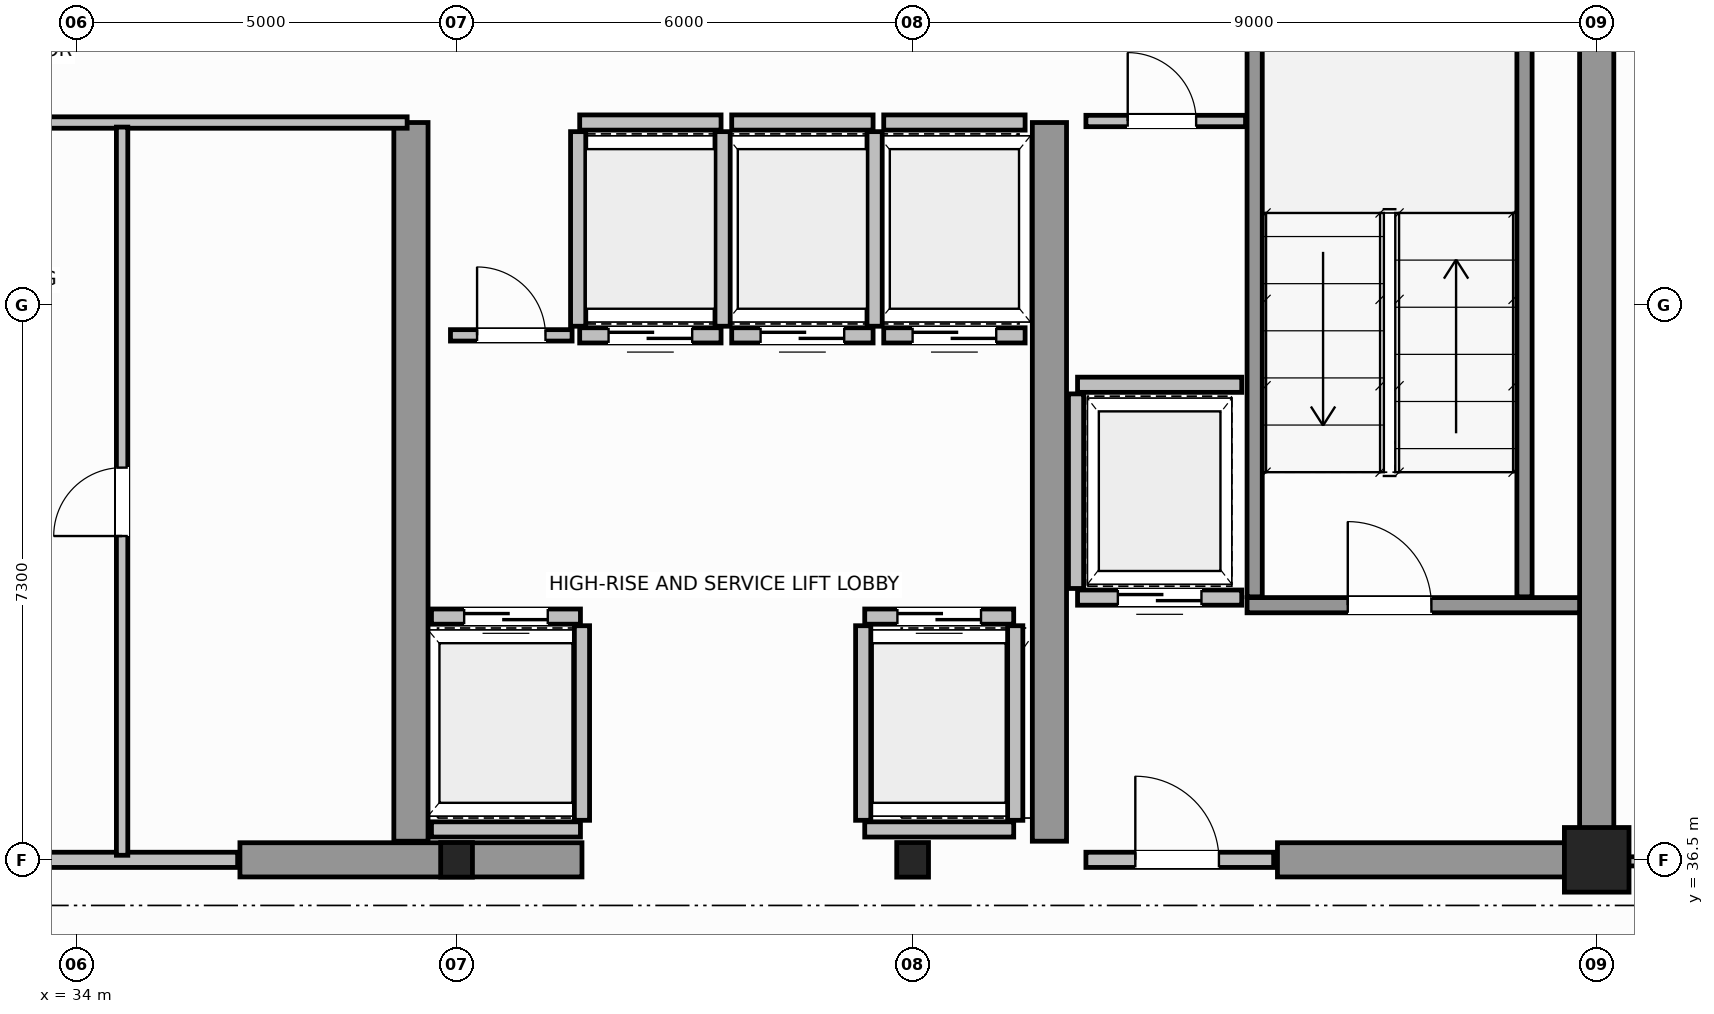
"""IFC4 building model, lengths in metres.
Left out: names, types, materials, properties, quantities, classifications, styles, units other than length and angle.
Written with IfcOpenShell. Run it as: python <this file> out.ifc"""

import sys

from ifc_helpers import new_model, si_unit, direction, frame, frame_2d, origin, origin_2d, place, context, subcontext, project, spatial, rectangle, i_section, extrude, source, transform, mapped, element, fill, save


model = new_model("IFC4")
c1 = context("Model", 3, precision=1e-05, world=origin(), true_north=direction((0.0, 1.0)))
c2 = subcontext(c1, "Body", "Model", "MODEL_VIEW")
j1 = project(units=[si_unit("LENGTHUNIT", "METRE"), si_unit("PLANEANGLEUNIT", "RADIAN")], contexts=[c1])
p1 = place(None, origin())
s1 = spatial("IfcSite", under=j1, at=p1, CompositionType="ELEMENT")
p2 = place(p1, origin())
s2 = spatial("IfcBuilding", under=s1, at=p2, CompositionType="ELEMENT")
p3 = place(p2, frame((0.0, 0.0, 265.0)))
s3 = spatial("IfcBuildingStorey", under=s2, at=p3, CompositionType="ELEMENT", Elevation=265.0)
m1 = source(origin(), c2, "Body", "SweptSolid", [
    extrude(i_section(OverallWidth=0.418, OverallDepth=0.455, WebThickness=0.042, FlangeThickness=0.058, FilletRadius=0.015, at=origin_2d()), origin(), (0.0, 0.0, 1.0), 3.8),
])
for number, where, z_axis, x_axis in (
    (1, (39.0, 36.5, 0.0), (0.0, 0.0, 1.0), (1.0, 0.0, 0.0)),
    (2, (45.0, 36.5, 0.0), (0.0, 0.0, 1.0), (1.0, 0.0, 0.0)),
):
    element("IfcColumn", number, at=place(p3, frame(where, z_axis=z_axis, x_axis=x_axis)), inside=s3, PredefinedType="COLUMN", context=c2, shape_type="MappedRepresentation", body=[
        mapped(m1, transform((0.0, 0.0, 0.0), scale=1.0)),
    ])
m2 = source(origin(), c2, "Body", "SweptSolid", [
    extrude(rectangle(XDim=0.85, YDim=0.85, at=origin_2d()), origin(), (0.0, 0.0, 1.0), 3.8),
])
p4 = place(p3, frame((54.0, 36.5, 0.0), z_axis=(0.0, 0.0, 1.0), x_axis=(1.0, 0.0, 0.0)))
e3 = element("IfcColumn", 3, at=p4, inside=s3, PredefinedType="COLUMN", context=c2, shape_type="MappedRepresentation", body=[
    mapped(m2, transform((0.0, 0.0, 0.0), scale=1.0)),
])
p5 = place(p3, frame((54.0, 36.5, 0.0), z_axis=(0.0, 0.0, 1.0), x_axis=(0.0, 1.0, 0.0)))
e4 = element("IfcWall", 4, at=p5, inside=s3, PredefinedType="SHEAR", context=c2, shape_type="SweptSolid", body=[
    extrude(rectangle(XDim=14.5, YDim=0.45, at=frame_2d((7.25, 0.0))), origin(), (0.0, 0.0, 1.0), 3.8),
])
p6 = place(p3, frame((36.15, 36.5, 0.0), z_axis=(0.0, 0.0, 1.0), x_axis=(1.0, 0.0, 0.0)))
e5 = element("IfcWall", 5, at=p6, inside=s3, PredefinedType="SHEAR", context=c2, shape_type="SweptSolid", body=[
    extrude(rectangle(XDim=4.5, YDim=0.45, at=frame_2d((2.25, 0.0))), origin(), (0.0, 0.0, 1.0), 3.8),
])
p7 = place(p3, frame((49.8, 36.5, 0.0), z_axis=(0.0, 0.0, 1.0), x_axis=(1.0, 0.0, 0.0)))
e6 = element("IfcWall", 6, at=p7, inside=s3, PredefinedType="SHEAR", context=c2, shape_type="SweptSolid", body=[
    extrude(rectangle(XDim=3.955, YDim=0.45, at=frame_2d((1.978, 0.0))), origin(), (0.0, 0.0, 1.0), 2.58),
])
for number, where, z_axis, x_axis in (
    (7, (38.4, 36.745, 0.0), (0.0, 0.0, 1.0), (0.0, 1.0, 0.0)),
    (8, (46.8, 36.745, 0.0), (0.0, 0.0, 1.0), (0.0, 1.0, 0.0)),
):
    element("IfcWall", number, at=place(p3, frame(where, z_axis=z_axis, x_axis=x_axis)), inside=s3, PredefinedType="SHEAR", context=c2, shape_type="SweptSolid", body=[
        extrude(rectangle(XDim=9.455, YDim=0.45, at=frame_2d((4.728, 0.0))), origin(), (0.0, 0.0, 1.0), 3.8),
    ])
p8 = place(p3, frame((49.4, 39.85, 0.0), z_axis=(0.0, 0.0, 1.0), x_axis=(1.0, 0.0, 0.0)))
e9 = element("IfcWall", 9, at=p8, inside=s3, PredefinedType="SOLIDWALL", context=c2, shape_type="SweptSolid", body=[
    extrude(rectangle(XDim=4.375, YDim=0.2, at=frame_2d((2.188, 0.0))), origin(), (0.0, 0.0, 1.0), 3.8),
])
p9 = place(p8, frame((1.325, 0.0, 0.0)))
e10 = element("IfcOpeningElement", 10, at=p9, cuts=e9, PredefinedType="OPENING", context=c2, shape_type="SweptSolid", body=[
    extrude(rectangle(XDim=1.1, YDim=2.15, at=frame_2d((0.55, 1.075))), frame((0.0, 0.11, 0.0), z_axis=(0.0, -1.0, 0.0), x_axis=(1.0, 0.0, 0.0)), (0.0, 0.0, 1.0), 0.22),
])
for number, where, z_axis, x_axis in (
    (11, (49.5, 39.96, 0.0), (0.0, 0.0, 1.0), (0.0, 1.0, 0.0)),
    (12, (53.05, 39.96, 0.0), (0.0, 0.0, 1.0), (0.0, 1.0, 0.0)),
):
    element("IfcWall", number, at=place(p3, frame(where, z_axis=z_axis, x_axis=x_axis)), inside=s3, PredefinedType="SOLIDWALL", context=c2, shape_type="SweptSolid", body=[
        extrude(rectangle(XDim=9.93, YDim=0.2, at=frame_2d((4.965, 0.0))), origin(), (0.0, 0.0, 1.0), 3.8),
    ])
p10 = place(p3, frame((47.28, 36.5, 0.0), z_axis=(0.0, 0.0, 1.0), x_axis=(1.0, 0.0, 0.0)))
e13 = element("IfcWall", 13, at=p10, inside=s3, PredefinedType="SOLIDWALL", context=c2, shape_type="SweptSolid", body=[
    extrude(rectangle(XDim=2.47, YDim=0.2, at=frame_2d((1.235, 0.0))), origin(), (0.0, 0.0, 1.0), 2.57),
])
p11 = place(p10, frame((0.65, 0.0, 0.0)))
e14 = element("IfcOpeningElement", 14, at=p11, cuts=e13, PredefinedType="OPENING", context=c2, shape_type="SweptSolid", body=[
    extrude(rectangle(XDim=1.1, YDim=2.15, at=frame_2d((0.55, 1.075))), frame((0.0, 0.11, 0.0), z_axis=(0.0, -1.0, 0.0), x_axis=(1.0, 0.0, 0.0)), (0.0, 0.0, 1.0), 0.22),
])
p12 = place(p3, frame((38.67, 39.7, 0.0), z_axis=(0.0, 0.0, 1.0), x_axis=(1.0, 0.0, 0.0)))
e15 = element("IfcWall", 15, at=p12, inside=s3, PredefinedType="SOLIDWALL", context=c2, shape_type="SweptSolid", body=[
    extrude(rectangle(XDim=1.96, YDim=0.2, at=frame_2d((0.98, 0.0))), origin(), (0.0, 0.0, 1.0), 3.58),
])
p13 = place(p12, frame((0.43, 0.0, 0.0)))
e16 = element("IfcOpeningElement", 16, at=p13, cuts=e15, PredefinedType="OPENING", context=c2, shape_type="SweptSolid", body=[
    extrude(rectangle(XDim=1.1, YDim=2.15, at=frame_2d((0.55, 1.075))), frame((0.0, 0.11, 0.0), z_axis=(0.0, -1.0, 0.0), x_axis=(1.0, 0.0, 0.0)), (0.0, 0.0, 1.0), 0.22),
])
p14 = place(p3, frame((38.67, 36.9, 0.0), z_axis=(0.0, 0.0, 1.0), x_axis=(1.0, 0.0, 0.0)))
e17 = element("IfcWall", 17, at=p14, inside=s3, PredefinedType="SOLIDWALL", context=c2, shape_type="SweptSolid", body=[
    extrude(rectangle(XDim=1.96, YDim=0.2, at=frame_2d((0.98, 0.0))), origin(), (0.0, 0.0, 1.0), 2.37),
])
p15 = place(p3, frame((40.65, 37.02, 0.0), z_axis=(0.0, 0.0, 1.0), x_axis=(0.0, 1.0, 0.0)))
e18 = element("IfcWall", 18, at=p15, inside=s3, PredefinedType="SOLIDWALL", context=c2, shape_type="SweptSolid", body=[
    extrude(rectangle(XDim=2.56, YDim=0.2, at=frame_2d((1.28, 0.0))), origin(), (0.0, 0.0, 1.0), 3.58),
])
p16 = place(p3, frame((44.37, 39.7, 0.0), z_axis=(0.0, 0.0, 1.0), x_axis=(1.0, 0.0, 0.0)))
e19 = element("IfcWall", 19, at=p16, inside=s3, PredefinedType="SOLIDWALL", context=c2, shape_type="SweptSolid", body=[
    extrude(rectangle(XDim=1.96, YDim=0.2, at=frame_2d((0.98, 0.0))), origin(), (0.0, 0.0, 1.0), 3.58),
])
p17 = place(p16, frame((0.43, 0.0, 0.0)))
e20 = element("IfcOpeningElement", 20, at=p17, cuts=e19, PredefinedType="OPENING", context=c2, shape_type="SweptSolid", body=[
    extrude(rectangle(XDim=1.1, YDim=2.15, at=frame_2d((0.55, 1.075))), frame((0.0, 0.11, 0.0), z_axis=(0.0, -1.0, 0.0), x_axis=(1.0, 0.0, 0.0)), (0.0, 0.0, 1.0), 0.22),
])
p18 = place(p3, frame((44.37, 36.9, 0.0), z_axis=(0.0, 0.0, 1.0), x_axis=(1.0, 0.0, 0.0)))
e21 = element("IfcWall", 21, at=p18, inside=s3, PredefinedType="SOLIDWALL", context=c2, shape_type="SweptSolid", body=[
    extrude(rectangle(XDim=1.96, YDim=0.2, at=frame_2d((0.98, 0.0))), origin(), (0.0, 0.0, 1.0), 2.37),
])
for number, where, z_axis, x_axis in (
    (22, (44.35, 37.02, 0.0), (0.0, 0.0, 1.0), (0.0, 1.0, 0.0)),
    (23, (46.35, 37.02, 0.0), (0.0, 0.0, 1.0), (0.0, 1.0, 0.0)),
):
    element("IfcWall", number, at=place(p3, frame(where, z_axis=z_axis, x_axis=x_axis)), inside=s3, PredefinedType="SOLIDWALL", context=c2, shape_type="SweptSolid", body=[
        extrude(rectangle(XDim=2.56, YDim=0.2, at=frame_2d((1.28, 0.0))), origin(), (0.0, 0.0, 1.0), 3.58),
    ])
p19 = place(p3, frame((40.62, 43.4, 0.0), z_axis=(0.0, 0.0, 1.0), x_axis=(1.0, 0.0, 0.0)))
e24 = element("IfcWall", 24, at=p19, inside=s3, PredefinedType="SOLIDWALL", context=c2, shape_type="SweptSolid", body=[
    extrude(rectangle(XDim=1.86, YDim=0.2, at=frame_2d((0.93, 0.0))), origin(), (0.0, 0.0, 1.0), 3.58),
])
p20 = place(p19, frame((0.38, 0.0, 0.0)))
e25 = element("IfcOpeningElement", 25, at=p20, cuts=e24, PredefinedType="OPENING", context=c2, shape_type="SweptSolid", body=[
    extrude(rectangle(XDim=1.1, YDim=2.15, at=frame_2d((0.55, 1.075))), frame((0.0, 0.11, 0.0), z_axis=(0.0, -1.0, 0.0), x_axis=(1.0, 0.0, 0.0)), (0.0, 0.0, 1.0), 0.22),
])
p21 = place(p3, frame((40.62, 46.2, 0.0), z_axis=(0.0, 0.0, 1.0), x_axis=(1.0, 0.0, 0.0)))
e26 = element("IfcWall", 26, at=p21, inside=s3, PredefinedType="SOLIDWALL", context=c2, shape_type="SweptSolid", body=[
    extrude(rectangle(XDim=1.86, YDim=0.2, at=frame_2d((0.93, 0.0))), origin(), (0.0, 0.0, 1.0), 3.58),
])
for number, where, z_axis, x_axis in (
    (27, (40.6, 43.52, 0.0), (0.0, 0.0, 1.0), (0.0, 1.0, 0.0)),
    (28, (42.5, 43.52, 0.0), (0.0, 0.0, 1.0), (0.0, 1.0, 0.0)),
):
    element("IfcWall", number, at=place(p3, frame(where, z_axis=z_axis, x_axis=x_axis)), inside=s3, PredefinedType="SOLIDWALL", context=c2, shape_type="SweptSolid", body=[
        extrude(rectangle(XDim=2.56, YDim=0.2, at=frame_2d((1.28, 0.0))), origin(), (0.0, 0.0, 1.0), 3.58),
    ])
p22 = place(p3, frame((42.62, 43.4, 0.0), z_axis=(0.0, 0.0, 1.0), x_axis=(1.0, 0.0, 0.0)))
e29 = element("IfcWall", 29, at=p22, inside=s3, PredefinedType="SOLIDWALL", context=c2, shape_type="SweptSolid", body=[
    extrude(rectangle(XDim=1.86, YDim=0.2, at=frame_2d((0.93, 0.0))), origin(), (0.0, 0.0, 1.0), 3.58),
])
p23 = place(p22, frame((0.38, 0.0, 0.0)))
e30 = element("IfcOpeningElement", 30, at=p23, cuts=e29, PredefinedType="OPENING", context=c2, shape_type="SweptSolid", body=[
    extrude(rectangle(XDim=1.1, YDim=2.15, at=frame_2d((0.55, 1.075))), frame((0.0, 0.11, 0.0), z_axis=(0.0, -1.0, 0.0), x_axis=(1.0, 0.0, 0.0)), (0.0, 0.0, 1.0), 0.22),
])
p24 = place(p3, frame((42.62, 46.2, 0.0), z_axis=(0.0, 0.0, 1.0), x_axis=(1.0, 0.0, 0.0)))
e31 = element("IfcWall", 31, at=p24, inside=s3, PredefinedType="SOLIDWALL", context=c2, shape_type="SweptSolid", body=[
    extrude(rectangle(XDim=1.86, YDim=0.2, at=frame_2d((0.93, 0.0))), origin(), (0.0, 0.0, 1.0), 3.58),
])
p25 = place(p3, frame((44.5, 43.52, 0.0), z_axis=(0.0, 0.0, 1.0), x_axis=(0.0, 1.0, 0.0)))
e32 = element("IfcWall", 32, at=p25, inside=s3, PredefinedType="SOLIDWALL", context=c2, shape_type="SweptSolid", body=[
    extrude(rectangle(XDim=2.56, YDim=0.2, at=frame_2d((1.28, 0.0))), origin(), (0.0, 0.0, 1.0), 2.37),
])
p26 = place(p3, frame((44.62, 43.4, 0.0), z_axis=(0.0, 0.0, 1.0), x_axis=(1.0, 0.0, 0.0)))
e33 = element("IfcWall", 33, at=p26, inside=s3, PredefinedType="SOLIDWALL", context=c2, shape_type="SweptSolid", body=[
    extrude(rectangle(XDim=1.86, YDim=0.2, at=frame_2d((0.93, 0.0))), origin(), (0.0, 0.0, 1.0), 3.58),
])
p27 = place(p26, frame((0.38, 0.0, 0.0)))
e34 = element("IfcOpeningElement", 34, at=p27, cuts=e33, PredefinedType="OPENING", context=c2, shape_type="SweptSolid", body=[
    extrude(rectangle(XDim=1.1, YDim=2.15, at=frame_2d((0.55, 1.075))), frame((0.0, 0.11, 0.0), z_axis=(0.0, -1.0, 0.0), x_axis=(1.0, 0.0, 0.0)), (0.0, 0.0, 1.0), 0.22),
])
p28 = place(p3, frame((44.62, 46.2, 0.0), z_axis=(0.0, 0.0, 1.0), x_axis=(1.0, 0.0, 0.0)))
e35 = element("IfcWall", 35, at=p28, inside=s3, PredefinedType="SOLIDWALL", context=c2, shape_type="SweptSolid", body=[
    extrude(rectangle(XDim=1.86, YDim=0.2, at=frame_2d((0.93, 0.0))), origin(), (0.0, 0.0, 1.0), 3.58),
])
p29 = place(p3, frame((47.17, 39.95, 0.0), z_axis=(0.0, 0.0, 1.0), x_axis=(1.0, 0.0, 0.0)))
e36 = element("IfcWall", 36, at=p29, inside=s3, PredefinedType="SOLIDWALL", context=c2, shape_type="SweptSolid", body=[
    extrude(rectangle(XDim=2.16, YDim=0.2, at=frame_2d((1.08, 0.0))), origin(), (0.0, 0.0, 1.0), 3.58),
])
p30 = place(p29, frame((0.53, 0.0, 0.0)))
e37 = element("IfcOpeningElement", 37, at=p30, cuts=e36, PredefinedType="OPENING", context=c2, shape_type="SweptSolid", body=[
    extrude(rectangle(XDim=1.1, YDim=2.15, at=frame_2d((0.55, 1.075))), frame((0.0, 0.11, 0.0), z_axis=(0.0, -1.0, 0.0), x_axis=(1.0, 0.0, 0.0)), (0.0, 0.0, 1.0), 0.22),
])
p31 = place(p3, frame((47.17, 42.75, 0.0), z_axis=(0.0, 0.0, 1.0), x_axis=(1.0, 0.0, 0.0)))
e38 = element("IfcWall", 38, at=p31, inside=s3, PredefinedType="SOLIDWALL", context=c2, shape_type="SweptSolid", body=[
    extrude(rectangle(XDim=2.16, YDim=0.2, at=frame_2d((1.08, 0.0))), origin(), (0.0, 0.0, 1.0), 3.58),
])
p32 = place(p3, frame((47.15, 40.07, 0.0), z_axis=(0.0, 0.0, 1.0), x_axis=(0.0, 1.0, 0.0)))
e39 = element("IfcWall", 39, at=p32, inside=s3, PredefinedType="SOLIDWALL", context=c2, shape_type="SweptSolid", body=[
    extrude(rectangle(XDim=2.56, YDim=0.2, at=frame_2d((1.28, 0.0))), origin(), (0.0, 0.0, 1.0), 3.58),
])
p33 = place(p3, frame((32.08, 36.5, 0.0), z_axis=(0.0, 0.0, 1.0), x_axis=(1.0, 0.0, 0.0)))
e40 = element("IfcWall", 40, at=p33, inside=s3, PredefinedType="SOLIDWALL", context=c2, shape_type="SweptSolid", body=[
    extrude(rectangle(XDim=4.04, YDim=0.2, at=frame_2d((2.02, 0.0))), origin(), (0.0, 0.0, 1.0), 2.37),
])
p34 = place(p33, frame((0.45, 0.0, 0.0)))
e41 = element("IfcOpeningElement", 41, at=p34, cuts=e40, PredefinedType="OPENING", context=c2, shape_type="SweptSolid", body=[
    extrude(rectangle(XDim=1.1, YDim=2.15, at=frame_2d((0.55, 1.075))), frame((0.0, 0.11, 0.0), z_axis=(0.0, -1.0, 0.0), x_axis=(1.0, 0.0, 0.0)), (0.0, 0.0, 1.0), 0.22),
])
p35 = place(p3, frame((29.85, 46.2, 0.0), z_axis=(0.0, 0.0, 1.0), x_axis=(1.0, 0.0, 0.0)))
e42 = element("IfcWall", 42, at=p35, inside=s3, PredefinedType="PARTITIONING", context=c2, shape_type="SweptSolid", body=[
    extrude(rectangle(XDim=8.5, YDim=0.15, at=frame_2d((4.25, 0.0))), origin(), (0.0, 0.0, 1.0), 3.58),
])
p36 = place(p3, frame((34.6, 36.56, 0.0), z_axis=(0.0, 0.0, 1.0), x_axis=(0.0, 1.0, 0.0)))
e43 = element("IfcWall", 43, at=p36, inside=s3, PredefinedType="PARTITIONING", context=c2, shape_type="SweptSolid", body=[
    extrude(rectangle(XDim=9.58, YDim=0.15, at=frame_2d((4.79, 0.0))), origin(), (0.0, 0.0, 1.0), 3.58),
])
p37 = place(p36, frame((4.2, 0.0, 0.0)))
e44 = element("IfcOpeningElement", 44, at=p37, cuts=e43, PredefinedType="OPENING", context=c2, shape_type="SweptSolid", body=[
    extrude(rectangle(XDim=0.9, YDim=2.1, at=frame_2d((0.45, 1.05))), frame((0.0, 0.085, 0.0), z_axis=(0.0, -1.0, 0.0), x_axis=(1.0, 0.0, 0.0)), (0.0, 0.0, 1.0), 0.17),
])
p38 = place(p3, frame((47.28, 46.22, 0.0), z_axis=(0.0, 0.0, 1.0), x_axis=(1.0, 0.0, 0.0)))
e45 = element("IfcWall", 45, at=p38, inside=s3, PredefinedType="PARTITIONING", context=c2, shape_type="SweptSolid", body=[
    extrude(rectangle(XDim=2.1, YDim=0.15, at=frame_2d((1.05, 0.0))), origin(), (0.0, 0.0, 1.0), 3.58),
])
p39 = place(p38, frame((0.55, 0.0, 0.0)))
e46 = element("IfcOpeningElement", 46, at=p39, cuts=e45, PredefinedType="OPENING", context=c2, shape_type="SweptSolid", body=[
    extrude(rectangle(XDim=0.9, YDim=2.1, at=frame_2d((0.45, 1.05))), frame((0.0, 0.085, 0.0), z_axis=(0.0, -1.0, 0.0), x_axis=(1.0, 0.0, 0.0)), (0.0, 0.0, 1.0), 0.17),
])
p40 = place(p3, frame((38.92, 43.4, 0.0), z_axis=(0.0, 0.0, 1.0), x_axis=(1.0, 0.0, 0.0)))
e47 = element("IfcWall", 47, at=p40, inside=s3, PredefinedType="PARTITIONING", context=c2, shape_type="SweptSolid", body=[
    extrude(rectangle(XDim=1.6, YDim=0.15, at=frame_2d((0.8, 0.0))), origin(), (0.0, 0.0, 1.0), 3.58),
])
p41 = place(p40, frame((0.35, 0.0, 0.0)))
e48 = element("IfcOpeningElement", 48, at=p41, cuts=e47, PredefinedType="OPENING", context=c2, shape_type="SweptSolid", body=[
    extrude(rectangle(XDim=0.9, YDim=2.1, at=frame_2d((0.45, 1.05))), frame((0.0, 0.085, 0.0), z_axis=(0.0, -1.0, 0.0), x_axis=(1.0, 0.0, 0.0)), (0.0, 0.0, 1.0), 0.17),
])
p42 = place(p3, frame((54.06, 36.48, 0.0), z_axis=(0.0, 0.0, 1.0), x_axis=(1.0, 0.0, 0.0)))
e49 = element("IfcWall", 49, at=p42, inside=s3, PredefinedType="PARTITIONING", context=c2, shape_type="SweptSolid", body=[
    extrude(rectangle(XDim=6.619, YDim=0.12, at=frame_2d((3.31, 0.0))), origin(), (0.0, 0.0, 1.0), 2.37),
])
p43 = place(p42, frame((2.859, 0.0, 0.0)))
e50 = element("IfcOpeningElement", 50, at=p43, cuts=e49, PredefinedType="OPENING", context=c2, shape_type="SweptSolid", body=[
    extrude(rectangle(XDim=0.9, YDim=2.15, at=frame_2d((0.45, 1.075))), frame((0.0, 0.07, 0.0), z_axis=(0.0, -1.0, 0.0), x_axis=(1.0, 0.0, 0.0)), (0.0, 0.0, 1.0), 0.14),
])
m3 = source(origin(), c2, "Body", "SweptSolid", [
    extrude(rectangle(XDim=1.1, YDim=2.15, at=frame_2d((0.55, 1.075))), frame((0.0, 0.025, 0.0), z_axis=(0.0, -1.0, 0.0), x_axis=(1.0, 0.0, 0.0)), (0.0, 0.0, 1.0), 0.05),
])
p44 = place(p9, origin())
e51 = element("IfcDoor", 51, at=p44, inside=s3, OperationType="SINGLE_SWING_RIGHT", PredefinedType="DOOR", context=c2, shape_type="MappedRepresentation", body=[
    mapped(m3, transform((0.0, 0.0, 0.0), scale=1.0)),
])
fill(e10, e51)
p45 = place(p11, origin())
e52 = element("IfcDoor", 52, at=p45, inside=s3, OperationType="SINGLE_SWING_LEFT", PredefinedType="DOOR", context=c2, shape_type="MappedRepresentation", body=[
    mapped(m3, transform((0.0, 0.0, 0.0), scale=1.0)),
])
fill(e14, e52)
p46 = place(p13, origin())
e53 = element("IfcDoor", 53, at=p46, inside=s3, OperationType="DOUBLE_DOOR_SLIDING", PredefinedType="DOOR", context=c2, shape_type="MappedRepresentation", body=[
    mapped(m3, transform((0.0, 0.0, 0.0), scale=1.0)),
])
fill(e16, e53)
p47 = place(p17, origin())
e54 = element("IfcDoor", 54, at=p47, inside=s3, OperationType="DOUBLE_DOOR_SLIDING", PredefinedType="DOOR", context=c2, shape_type="MappedRepresentation", body=[
    mapped(m3, transform((0.0, 0.0, 0.0), scale=1.0)),
])
fill(e20, e54)
p48 = place(p20, origin())
e55 = element("IfcDoor", 55, at=p48, inside=s3, OperationType="DOUBLE_DOOR_SLIDING", PredefinedType="DOOR", context=c2, shape_type="MappedRepresentation", body=[
    mapped(m3, transform((0.0, 0.0, 0.0), scale=1.0)),
])
fill(e25, e55)
p49 = place(p23, origin())
e56 = element("IfcDoor", 56, at=p49, inside=s3, OperationType="DOUBLE_DOOR_SLIDING", PredefinedType="DOOR", context=c2, shape_type="MappedRepresentation", body=[
    mapped(m3, transform((0.0, 0.0, 0.0), scale=1.0)),
])
fill(e30, e56)
p50 = place(p27, origin())
e57 = element("IfcDoor", 57, at=p50, inside=s3, OperationType="DOUBLE_DOOR_SLIDING", PredefinedType="DOOR", context=c2, shape_type="MappedRepresentation", body=[
    mapped(m3, transform((0.0, 0.0, 0.0), scale=1.0)),
])
fill(e34, e57)
p51 = place(p30, origin())
e58 = element("IfcDoor", 58, at=p51, inside=s3, OperationType="DOUBLE_DOOR_SLIDING", PredefinedType="DOOR", context=c2, shape_type="MappedRepresentation", body=[
    mapped(m3, transform((0.0, 0.0, 0.0), scale=1.0)),
])
fill(e37, e58)
m4 = source(origin(), c2, "Body", "SweptSolid", [
    extrude(rectangle(XDim=0.9, YDim=2.1, at=frame_2d((0.45, 1.05))), frame((0.0, 0.025, 0.0), z_axis=(0.0, -1.0, 0.0), x_axis=(1.0, 0.0, 0.0)), (0.0, 0.0, 1.0), 0.05),
])
p52 = place(p37, origin())
e59 = element("IfcDoor", 59, at=p52, inside=s3, OperationType="SINGLE_SWING_RIGHT", PredefinedType="DOOR", context=c2, shape_type="MappedRepresentation", body=[
    mapped(m4, transform((0.0, 0.0, 0.0), scale=1.0)),
])
fill(e44, e59)
p53 = place(p39, origin())
e60 = element("IfcDoor", 60, at=p53, inside=s3, OperationType="SINGLE_SWING_RIGHT", PredefinedType="DOOR", context=c2, shape_type="MappedRepresentation", body=[
    mapped(m4, transform((0.0, 0.0, 0.0), scale=1.0)),
])
fill(e46, e60)
p54 = place(p41, origin())
e61 = element("IfcDoor", 61, at=p54, inside=s3, OperationType="SINGLE_SWING_LEFT", PredefinedType="DOOR", context=c2, shape_type="MappedRepresentation", body=[
    mapped(m4, transform((0.0, 0.0, 0.0), scale=1.0)),
])
fill(e48, e61)
save(model, sys.argv[1])
